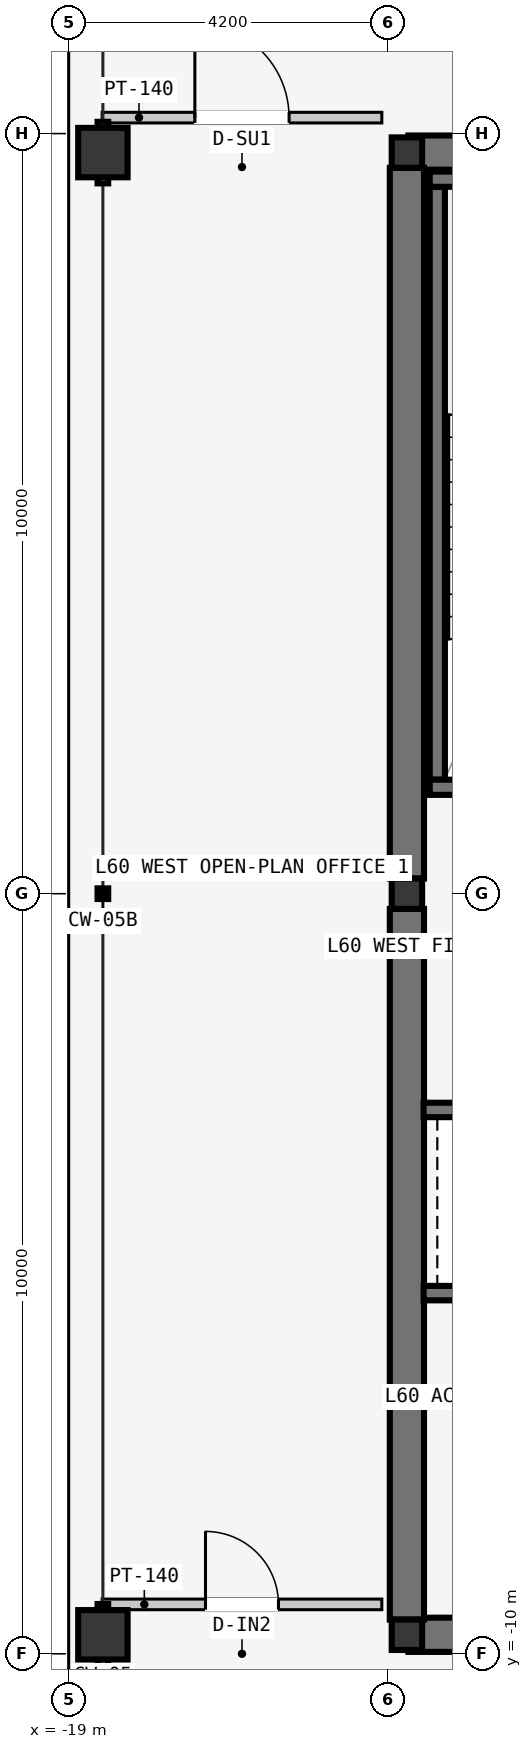
"""IFC4 building model, lengths in metres.
Left out: names, types, materials, properties, quantities, classifications, styles, units other than length and angle.
Written with IfcOpenShell. Run it as: python <this file> out.ifc"""

import sys

from ifc_helpers import new_model, si_unit, direction, frame, frame_2d, origin, origin_2d, place, context, subcontext, project, spatial, rectangle, hollow_rectangle, i_section, extrude, element, fill, save


model = new_model("IFC4")
c1 = context("Model", 3, precision=1e-05, world=origin(), true_north=direction((0.0, 1.0)))
c2 = subcontext(c1, "Body", "Model", "MODEL_VIEW")
j1 = project(units=[si_unit("LENGTHUNIT", "METRE"), si_unit("PLANEANGLEUNIT", "RADIAN")], contexts=[c1])
p1 = place(None, origin())
s1 = spatial("IfcSite", under=j1, at=p1, CompositionType="ELEMENT")
p2 = place(p1, origin())
s2 = spatial("IfcBuilding", under=s1, at=p2, CompositionType="ELEMENT")
p3 = place(p2, frame((0.0, 0.0, 229.2)))
s3 = spatial("IfcBuildingStorey", under=s2, at=p3, CompositionType="ELEMENT", Elevation=229.2)
for number, where, z_axis, x_axis in (
    (1, (-14.53, -9.75, -0.2), (0.0, 0.0, 1.0), (1.0, 0.0, 0.0)),
    (2, (-14.53, 9.75, -0.2), (0.0, 0.0, 1.0), (1.0, 0.0, 0.0)),
):
    element("IfcWall", number, at=place(p3, frame(where, z_axis=z_axis, x_axis=x_axis)), inside=s3, PredefinedType="SHEAR", context=c2, shape_type="SweptSolid", body=[
        extrude(rectangle(XDim=6.46, YDim=0.45, at=frame_2d((3.23, 0.0))), origin(), (0.0, 0.0, 1.0), 3.6),
    ])
for number, where, z_axis, x_axis in (
    (3, (-14.55, -9.55, -0.2), (0.0, 0.0, 1.0), (0.0, 1.0, 0.0)),
    (4, (-14.55, 0.2, -0.2), (0.0, 0.0, 1.0), (0.0, 1.0, 0.0)),
):
    element("IfcWall", number, at=place(p3, frame(where, z_axis=z_axis, x_axis=x_axis)), inside=s3, PredefinedType="SHEAR", context=c2, shape_type="SweptSolid", body=[
        extrude(rectangle(XDim=9.35, YDim=0.45, at=frame_2d((4.675, 0.0))), origin(), (0.0, 0.0, 1.0), 3.6),
    ])
p4 = place(p3, frame((-14.15, 1.5, -0.2), z_axis=(0.0, 0.0, 1.0), x_axis=(0.0, 1.0, 0.0)))
e5 = element("IfcWall", 5, at=p4, inside=s3, PredefinedType="SOLIDWALL", context=c2, shape_type="SweptSolid", body=[
    extrude(rectangle(XDim=7.8, YDim=0.2, at=frame_2d((3.9, 0.0))), origin(), (0.0, 0.0, 1.0), 3.6),
])
p5 = place(p3, frame((-14.25, 1.4, -0.2), z_axis=(0.0, 0.0, 1.0), x_axis=(1.0, 0.0, 0.0)))
e6 = element("IfcWall", 6, at=p5, inside=s3, PredefinedType="SOLIDWALL", context=c2, shape_type="SweptSolid", body=[
    extrude(rectangle(XDim=3.72, YDim=0.2, at=frame_2d((1.86, 0.0))), origin(), (0.0, 0.0, 1.0), 3.6),
])
p6 = place(p5, frame((1.5, 0.0, 0.2)))
e7 = element("IfcOpeningElement", 7, at=p6, cuts=e6, PredefinedType="OPENING", context=c2, shape_type="SweptSolid", body=[
    extrude(rectangle(XDim=1.12, YDim=2.18, at=frame_2d((0.56, 1.09))), frame((0.0, 0.11, 0.0), z_axis=(0.0, -1.0, 0.0), x_axis=(1.0, 0.0, 0.0)), (0.0, 0.0, 1.0), 0.22),
])
p7 = place(p3, frame((-14.25, 9.4, -0.2), z_axis=(0.0, 0.0, 1.0), x_axis=(1.0, 0.0, 0.0)))
e8 = element("IfcWall", 8, at=p7, inside=s3, PredefinedType="SOLIDWALL", context=c2, shape_type="SweptSolid", body=[
    extrude(rectangle(XDim=3.72, YDim=0.2, at=frame_2d((1.86, 0.0))), origin(), (0.0, 0.0, 1.0), 3.6),
])
for number, where, z_axis, x_axis in (
    (9, (-14.55, -9.75, 0.0), (0.0, 0.0, 1.0), (1.0, 0.0, 0.0)),
    (10, (-14.55, 0.0, 0.0), (0.0, 0.0, 1.0), (1.0, 0.0, 0.0)),
    (11, (-14.55, 9.75, 0.0), (0.0, 0.0, 1.0), (1.0, 0.0, 0.0)),
):
    element("IfcColumn", number, at=place(p3, frame(where, z_axis=z_axis, x_axis=x_axis)), inside=s3, PredefinedType="COLUMN", context=c2, shape_type="SweptSolid", body=[
        extrude(i_section(OverallWidth=0.4, OverallDepth=0.4, WebThickness=0.013, FlangeThickness=0.021, at=origin_2d()), origin(), (0.0, 0.0, 1.0), 3.6),
    ])
for number, where, z_axis, x_axis in (
    (12, (-18.55, -9.75, 0.0), (0.0, 0.0, 1.0), (0.0, 1.0, 0.0)),
    (13, (-18.55, 9.75, 0.0), (0.0, 0.0, 1.0), (0.0, 1.0, 0.0)),
):
    element("IfcColumn", number, at=place(p3, frame(where, z_axis=z_axis, x_axis=x_axis)), inside=s3, PredefinedType="COLUMN", context=c2, shape_type="SweptSolid", body=[
        extrude(hollow_rectangle(XDim=0.65, YDim=0.65, WallThickness=0.028, at=origin_2d()), origin(), (0.0, 0.0, 1.0), 3.6),
    ])
p8 = place(p3, frame((-14.33, -2.845, -0.2), z_axis=(0.0, 0.0, 1.0), x_axis=(1.0, 0.0, 0.0)))
e14 = element("IfcWall", 14, at=p8, inside=s3, PredefinedType="SOLIDWALL", context=c2, shape_type="SweptSolid", body=[
    extrude(rectangle(XDim=2.68, YDim=0.19, at=frame_2d((1.34, 0.0))), origin(), (0.0, 0.0, 1.0), 3.6),
])
p9 = place(p8, frame((0.83, 0.0, 0.2)))
e15 = element("IfcOpeningElement", 15, at=p9, cuts=e14, PredefinedType="OPENING", context=c2, shape_type="SweptSolid", body=[
    extrude(rectangle(XDim=1.2, YDim=2.2, at=frame_2d((0.6, 1.1))), frame((0.0, 0.105, 0.0), z_axis=(0.0, -1.0, 0.0), x_axis=(1.0, 0.0, 0.0)), (0.0, 0.0, 1.0), 0.21),
])
p10 = place(p3, frame((-14.33, -5.255, -0.2), z_axis=(0.0, 0.0, 1.0), x_axis=(1.0, 0.0, 0.0)))
e16 = element("IfcWall", 16, at=p10, inside=s3, PredefinedType="SOLIDWALL", context=c2, shape_type="SweptSolid", body=[
    extrude(rectangle(XDim=2.68, YDim=0.19, at=frame_2d((1.34, 0.0))), origin(), (0.0, 0.0, 1.0), 3.6),
])
p11 = place(p3, frame((-18.56, 10.21, 0.0), z_axis=(0.0, 0.0, 1.0), x_axis=(1.0, 0.0, 0.0)))
e17 = element("IfcWall", 17, at=p11, inside=s3, PredefinedType="PARTITIONING", context=c2, shape_type="SweptSolid", body=[
    extrude(rectangle(XDim=3.68, YDim=0.14, at=frame_2d((1.84, 0.0))), origin(), (0.0, 0.0, 1.0), 3.4),
])
p12 = place(p11, frame((1.22, 0.0, 0.0)))
e18 = element("IfcOpeningElement", 18, at=p12, cuts=e17, PredefinedType="OPENING", context=c2, shape_type="SweptSolid", body=[
    extrude(rectangle(XDim=1.24, YDim=2.24, at=frame_2d((0.62, 1.12))), frame((0.0, 0.08, 0.0), z_axis=(0.0, -1.0, 0.0), x_axis=(1.0, 0.0, 0.0)), (0.0, 0.0, 1.0), 0.16),
])
p13 = place(p3, frame((-18.56, -9.35, 0.0), z_axis=(0.0, 0.0, 1.0), x_axis=(1.0, 0.0, 0.0)))
e19 = element("IfcWall", 19, at=p13, inside=s3, PredefinedType="PARTITIONING", context=c2, shape_type="SweptSolid", body=[
    extrude(rectangle(XDim=3.68, YDim=0.14, at=frame_2d((1.84, 0.0))), origin(), (0.0, 0.0, 1.0), 3.4),
])
p14 = place(p13, frame((1.36, 0.0, 0.0)))
e20 = element("IfcOpeningElement", 20, at=p14, cuts=e19, PredefinedType="OPENING", context=c2, shape_type="SweptSolid", body=[
    extrude(rectangle(XDim=0.96, YDim=2.18, at=frame_2d((0.48, 1.09))), frame((0.0, 0.08, 0.0), z_axis=(0.0, -1.0, 0.0), x_axis=(1.0, 0.0, 0.0)), (0.0, 0.0, 1.0), 0.16),
])
p15 = place(p12, origin())
e21 = element("IfcDoor", 21, at=p15, inside=s3, OperationType="SINGLE_SWING_LEFT", PredefinedType="DOOR", context=c2, shape_type="SweptSolid", body=[
    extrude(rectangle(XDim=1.24, YDim=2.24, at=frame_2d((0.62, 1.12))), frame((0.0, 0.025, 0.0), z_axis=(0.0, -1.0, 0.0), x_axis=(1.0, 0.0, 0.0)), (0.0, 0.0, 1.0), 0.05),
])
fill(e18, e21)
p16 = place(p14, origin())
e22 = element("IfcDoor", 22, at=p16, inside=s3, OperationType="SINGLE_SWING_LEFT", PredefinedType="DOOR", context=c2, shape_type="SweptSolid", body=[
    extrude(rectangle(XDim=0.96, YDim=2.18, at=frame_2d((0.48, 1.09))), frame((0.0, 0.025, 0.0), z_axis=(0.0, -1.0, 0.0), x_axis=(1.0, 0.0, 0.0)), (0.0, 0.0, 1.0), 0.05),
])
fill(e20, e22)
save(model, sys.argv[1])
